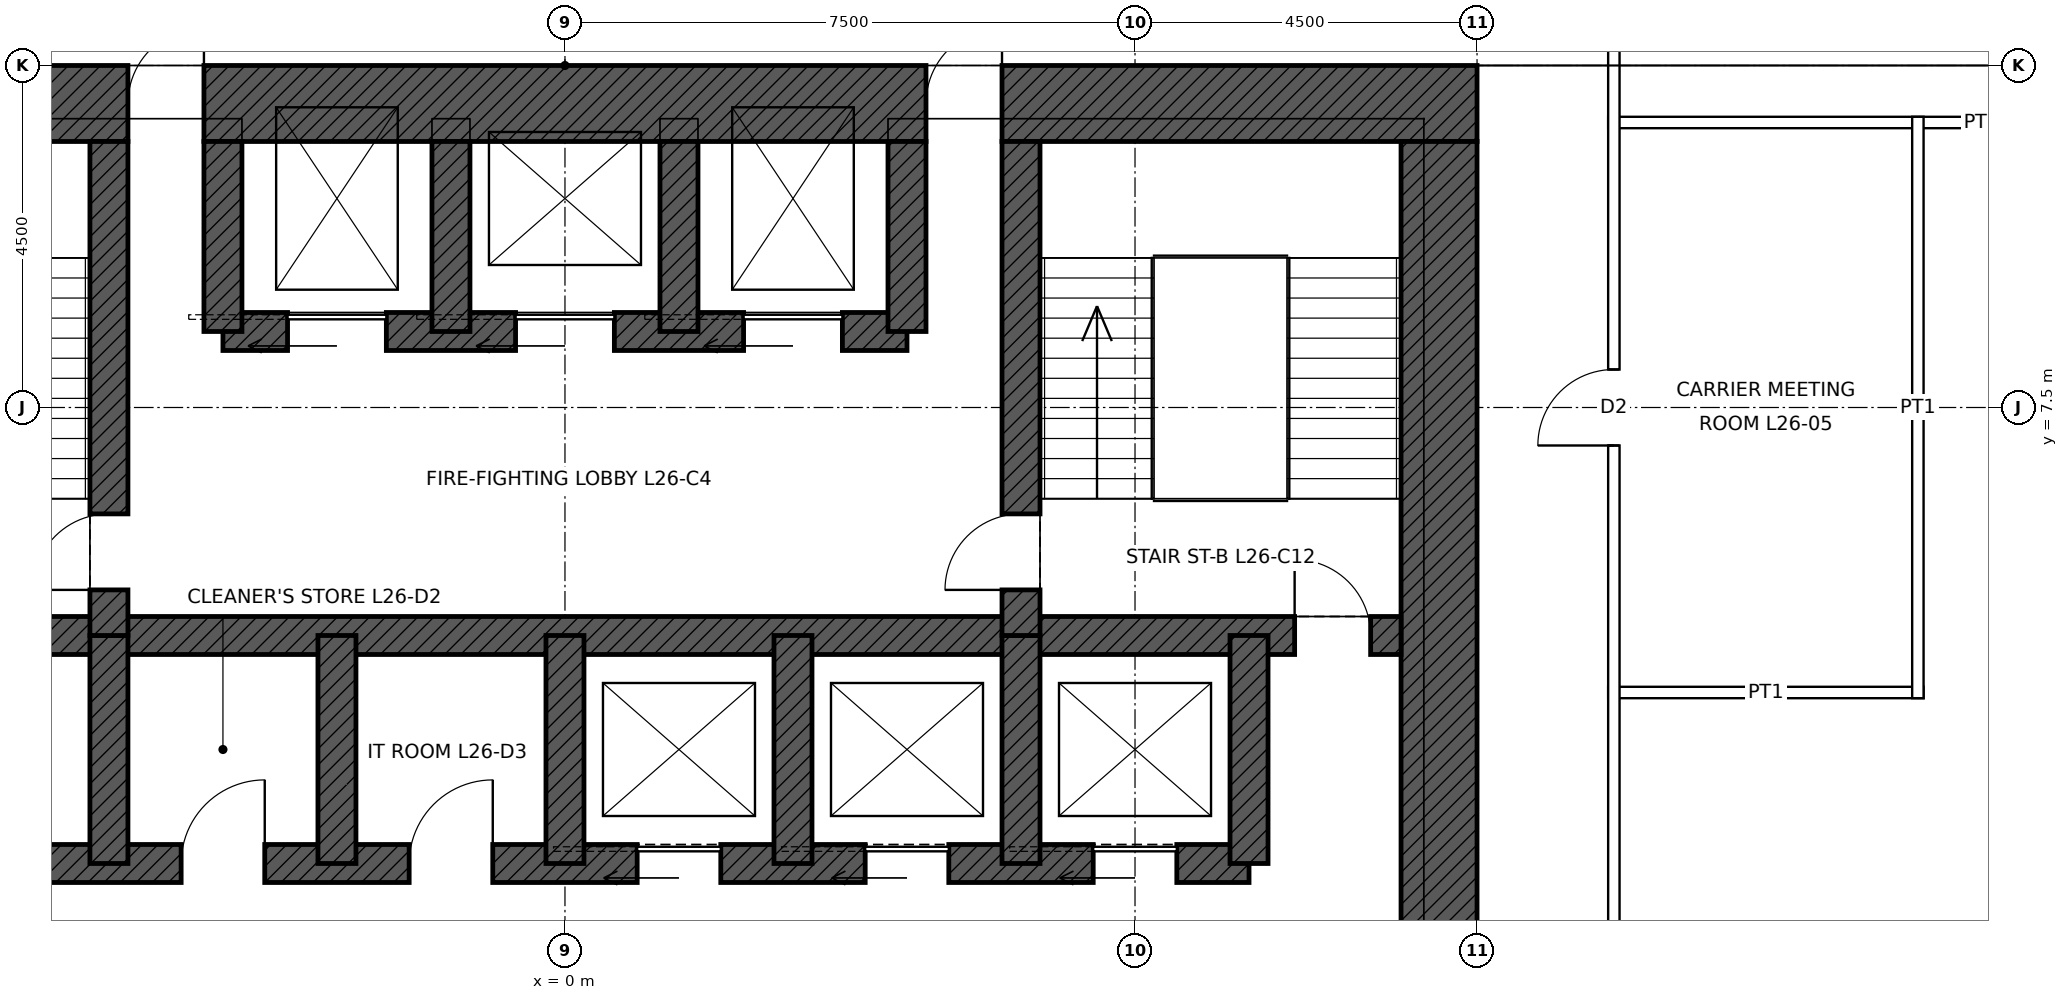
"""IFC4 building model, lengths in metres.
Left out: names, types, materials, properties, quantities, classifications, styles, units other than length and angle.
Written with IfcOpenShell. Run it as: python <this file> out.ifc"""

import sys

from ifc_helpers import new_model, si_unit, direction, frame, frame_2d, origin, place, context, subcontext, project, spatial, rectangle, extrude, element, fill, save


model = new_model("IFC4")
c1 = context("Model", 3, precision=1e-05, world=origin(), true_north=direction((0.0, 1.0)))
c2 = subcontext(c1, "Body", "Model", "MODEL_VIEW")
j1 = project(units=[si_unit("LENGTHUNIT", "METRE"), si_unit("PLANEANGLEUNIT", "RADIAN")], contexts=[c1])
p1 = place(None, origin())
s1 = spatial("IfcSite", under=j1, at=p1, CompositionType="ELEMENT")
p2 = place(p1, origin())
s2 = spatial("IfcBuilding", under=s1, at=p2, CompositionType="ELEMENT")
p3 = place(p2, frame((0.0, 0.0, 131.4)))
s3 = spatial("IfcBuildingStorey", under=s2, at=p3, CompositionType="ELEMENT", Elevation=131.4)
p4 = place(p3, frame((-12.0, 11.5, 0.0), z_axis=(0.0, 0.0, 1.0), x_axis=(1.0, 0.0, 0.0)))
e1 = element("IfcWall", 1, at=p4, inside=s3, PredefinedType="SHEAR", context=c2, shape_type="SweptSolid", body=[
    extrude(rectangle(XDim=24.0, YDim=1.0, at=frame_2d((12.0, 0.0))), origin(), (0.0, 0.0, 1.0), 4.5),
])
p5 = place(p4, frame((6.25, 0.0, 0.0)))
e2 = element("IfcOpeningElement", 2, at=p5, cuts=e1, PredefinedType="OPENING", context=c2, shape_type="SweptSolid", body=[
    extrude(rectangle(XDim=1.0, YDim=2.4, at=frame_2d((0.5, 1.2))), frame((0.0, 0.51, 0.0), z_axis=(0.0, -1.0, 0.0), x_axis=(1.0, 0.0, 0.0)), (0.0, 0.0, 1.0), 1.02),
])
p6 = place(p4, frame((16.75, 0.0, 0.0)))
e3 = element("IfcOpeningElement", 3, at=p6, cuts=e1, PredefinedType="OPENING", context=c2, shape_type="SweptSolid", body=[
    extrude(rectangle(XDim=1.0, YDim=2.4, at=frame_2d((0.5, 1.2))), frame((0.0, 0.51, 0.0), z_axis=(0.0, -1.0, 0.0), x_axis=(1.0, 0.0, 0.0)), (0.0, 0.0, 1.0), 1.02),
])
p7 = place(p3, frame((11.5, 11.0, 0.0), z_axis=(0.0, 0.0, 1.0), x_axis=(0.0, -1.0, 0.0)))
e4 = element("IfcWall", 4, at=p7, inside=s3, PredefinedType="SHEAR", context=c2, shape_type="SweptSolid", body=[
    extrude(rectangle(XDim=22.0, YDim=1.0, at=frame_2d((11.0, 0.0))), origin(), (0.0, 0.0, 1.0), 4.5),
])
p8 = place(p7, frame((10.5, 0.0, 0.0)))
e5 = element("IfcOpeningElement", 5, at=p8, cuts=e4, PredefinedType="OPENING", context=c2, shape_type="SweptSolid", body=[
    extrude(rectangle(XDim=1.0, YDim=2.4, at=frame_2d((0.5, 1.2))), frame((0.0, 0.51, 0.0), z_axis=(0.0, -1.0, 0.0), x_axis=(1.0, 0.0, 0.0)), (0.0, 0.0, 1.0), 1.02),
])
p9 = place(p3, frame((-11.0, 4.5, 0.0), z_axis=(0.0, 0.0, 1.0), x_axis=(1.0, 0.0, 0.0)))
e6 = element("IfcWall", 6, at=p9, inside=s3, PredefinedType="SHEAR", context=c2, shape_type="SweptSolid", body=[
    extrude(rectangle(XDim=22.0, YDim=0.5, at=frame_2d((11.0, 0.0))), origin(), (0.0, 0.0, 1.0), 4.5),
])
p10 = place(p9, frame((0.4, 0.0, 0.0)))
e7 = element("IfcOpeningElement", 7, at=p10, cuts=e6, PredefinedType="OPENING", context=c2, shape_type="SweptSolid", body=[
    extrude(rectangle(XDim=1.0, YDim=2.1, at=frame_2d((0.5, 1.05))), frame((0.0, 0.26, 0.0), z_axis=(0.0, -1.0, 0.0), x_axis=(1.0, 0.0, 0.0)), (0.0, 0.0, 1.0), 0.52),
])
p11 = place(p9, frame((20.6, 0.0, 0.0)))
e8 = element("IfcOpeningElement", 8, at=p11, cuts=e6, PredefinedType="OPENING", context=c2, shape_type="SweptSolid", body=[
    extrude(rectangle(XDim=1.0, YDim=2.1, at=frame_2d((0.5, 1.05))), frame((0.0, 0.26, 0.0), z_axis=(0.0, -1.0, 0.0), x_axis=(1.0, 0.0, 0.0)), (0.0, 0.0, 1.0), 0.52),
])
p12 = place(p3, frame((-9.0, 1.5, 0.0), z_axis=(0.0, 0.0, 1.0), x_axis=(1.0, 0.0, 0.0)))
e9 = element("IfcWall", 9, at=p12, inside=s3, PredefinedType="SHEAR", context=c2, shape_type="SweptSolid", body=[
    extrude(rectangle(XDim=18.0, YDim=0.5, at=frame_2d((9.0, 0.0))), origin(), (0.0, 0.0, 1.0), 4.5),
])
p13 = place(p12, frame((9.95, 0.0, 0.0)))
e10 = element("IfcOpeningElement", 10, at=p13, cuts=e9, PredefinedType="OPENING", context=c2, shape_type="SweptSolid", body=[
    extrude(rectangle(XDim=1.1, YDim=2.1, at=frame_2d((0.55, 1.05))), frame((0.0, 0.26, 0.0), z_axis=(0.0, -1.0, 0.0), x_axis=(1.0, 0.0, 0.0)), (0.0, 0.0, 1.0), 0.52),
])
p14 = place(p12, frame((12.95, 0.0, 0.0)))
e11 = element("IfcOpeningElement", 11, at=p14, cuts=e9, PredefinedType="OPENING", context=c2, shape_type="SweptSolid", body=[
    extrude(rectangle(XDim=1.1, YDim=2.1, at=frame_2d((0.55, 1.05))), frame((0.0, 0.26, 0.0), z_axis=(0.0, -1.0, 0.0), x_axis=(1.0, 0.0, 0.0)), (0.0, 0.0, 1.0), 0.52),
])
p15 = place(p12, frame((15.95, 0.0, 0.0)))
e12 = element("IfcOpeningElement", 12, at=p15, cuts=e9, PredefinedType="OPENING", context=c2, shape_type="SweptSolid", body=[
    extrude(rectangle(XDim=1.1, YDim=2.1, at=frame_2d((0.55, 1.05))), frame((0.0, 0.26, 0.0), z_axis=(0.0, -1.0, 0.0), x_axis=(1.0, 0.0, 0.0)), (0.0, 0.0, 1.0), 0.52),
])
p16 = place(p12, frame((0.95, 0.0, 0.0)))
e13 = element("IfcOpeningElement", 13, at=p16, cuts=e9, PredefinedType="OPENING", context=c2, shape_type="SweptSolid", body=[
    extrude(rectangle(XDim=1.1, YDim=2.1, at=frame_2d((0.55, 1.05))), frame((0.0, 0.26, 0.0), z_axis=(0.0, -1.0, 0.0), x_axis=(1.0, 0.0, 0.0)), (0.0, 0.0, 1.0), 0.52),
])
p17 = place(p12, frame((3.95, 0.0, 0.0)))
e14 = element("IfcOpeningElement", 14, at=p17, cuts=e9, PredefinedType="OPENING", context=c2, shape_type="SweptSolid", body=[
    extrude(rectangle(XDim=1.1, YDim=2.1, at=frame_2d((0.55, 1.05))), frame((0.0, 0.26, 0.0), z_axis=(0.0, -1.0, 0.0), x_axis=(1.0, 0.0, 0.0)), (0.0, 0.0, 1.0), 0.52),
])
p18 = place(p12, frame((6.95, 0.0, 0.0)))
e15 = element("IfcOpeningElement", 15, at=p18, cuts=e9, PredefinedType="OPENING", context=c2, shape_type="SweptSolid", body=[
    extrude(rectangle(XDim=1.1, YDim=2.1, at=frame_2d((0.55, 1.05))), frame((0.0, 0.26, 0.0), z_axis=(0.0, -1.0, 0.0), x_axis=(1.0, 0.0, 0.0)), (0.0, 0.0, 1.0), 0.52),
])
p19 = place(p3, frame((-4.5, 8.5, 0.0), z_axis=(0.0, 0.0, 1.0), x_axis=(1.0, 0.0, 0.0)))
e16 = element("IfcWall", 16, at=p19, inside=s3, PredefinedType="SHEAR", context=c2, shape_type="SweptSolid", body=[
    extrude(rectangle(XDim=9.0, YDim=0.5, at=frame_2d((4.5, 0.0))), origin(), (0.0, 0.0, 1.0), 4.5),
])
p20 = place(p19, frame((0.85, 0.0, 0.0)))
e17 = element("IfcOpeningElement", 17, at=p20, cuts=e16, PredefinedType="OPENING", context=c2, shape_type="SweptSolid", body=[
    extrude(rectangle(XDim=1.3, YDim=2.4, at=frame_2d((0.65, 1.2))), frame((0.0, 0.26, 0.0), z_axis=(0.0, -1.0, 0.0), x_axis=(1.0, 0.0, 0.0)), (0.0, 0.0, 1.0), 0.52),
])
p21 = place(p19, frame((6.85, 0.0, 0.0)))
e18 = element("IfcOpeningElement", 18, at=p21, cuts=e16, PredefinedType="OPENING", context=c2, shape_type="SweptSolid", body=[
    extrude(rectangle(XDim=1.3, YDim=2.4, at=frame_2d((0.65, 1.2))), frame((0.0, 0.26, 0.0), z_axis=(0.0, -1.0, 0.0), x_axis=(1.0, 0.0, 0.0)), (0.0, 0.0, 1.0), 0.52),
])
p22 = place(p19, frame((3.85, 0.0, 0.0)))
e19 = element("IfcOpeningElement", 19, at=p22, cuts=e16, PredefinedType="OPENING", context=c2, shape_type="SweptSolid", body=[
    extrude(rectangle(XDim=1.3, YDim=2.4, at=frame_2d((0.65, 1.2))), frame((0.0, 0.26, 0.0), z_axis=(0.0, -1.0, 0.0), x_axis=(1.0, 0.0, 0.0)), (0.0, 0.0, 1.0), 0.52),
])
for number, where, z_axis, x_axis in (
    (20, (9.0, 1.5, 0.0), (0.0, 0.0, 1.0), (0.0, 1.0, 0.0)),
    (21, (-6.0, 1.5, 0.0), (0.0, 0.0, 1.0), (0.0, 1.0, 0.0)),
    (22, (-3.0, 1.5, 0.0), (0.0, 0.0, 1.0), (0.0, 1.0, 0.0)),
    (23, (0.0, 1.5, 0.0), (0.0, 0.0, 1.0), (0.0, 1.0, 0.0)),
    (24, (3.0, 1.5, 0.0), (0.0, 0.0, 1.0), (0.0, 1.0, 0.0)),
    (25, (6.0, 1.5, 0.0), (0.0, 0.0, 1.0), (0.0, 1.0, 0.0)),
):
    element("IfcWall", number, at=place(p3, frame(where, z_axis=z_axis, x_axis=x_axis)), inside=s3, PredefinedType="SHEAR", context=c2, shape_type="SweptSolid", body=[
        extrude(rectangle(XDim=3.0, YDim=0.5, at=frame_2d((1.5, 0.0))), origin(), (0.0, 0.0, 1.0), 4.5),
    ])
p23 = place(p3, frame((-6.0, 4.5, 0.0), z_axis=(0.0, 0.0, 1.0), x_axis=(0.0, 1.0, 0.0)))
e26 = element("IfcWall", 26, at=p23, inside=s3, PredefinedType="SHEAR", context=c2, shape_type="SweptSolid", body=[
    extrude(rectangle(XDim=6.5, YDim=0.5, at=frame_2d((3.25, 0.0))), origin(), (0.0, 0.0, 1.0), 4.5),
])
p24 = place(p23, frame((0.6, 0.0, 0.0)))
e27 = element("IfcOpeningElement", 27, at=p24, cuts=e26, PredefinedType="OPENING", context=c2, shape_type="SweptSolid", body=[
    extrude(rectangle(XDim=1.0, YDim=2.1, at=frame_2d((0.5, 1.05))), frame((0.0, 0.26, 0.0), z_axis=(0.0, -1.0, 0.0), x_axis=(1.0, 0.0, 0.0)), (0.0, 0.0, 1.0), 0.52),
])
p25 = place(p3, frame((6.0, 4.5, 0.0), z_axis=(0.0, 0.0, 1.0), x_axis=(0.0, 1.0, 0.0)))
e28 = element("IfcWall", 28, at=p25, inside=s3, PredefinedType="SHEAR", context=c2, shape_type="SweptSolid", body=[
    extrude(rectangle(XDim=6.5, YDim=0.5, at=frame_2d((3.25, 0.0))), origin(), (0.0, 0.0, 1.0), 4.5),
])
p26 = place(p25, frame((0.6, 0.0, 0.0)))
e29 = element("IfcOpeningElement", 29, at=p26, cuts=e28, PredefinedType="OPENING", context=c2, shape_type="SweptSolid", body=[
    extrude(rectangle(XDim=1.0, YDim=2.1, at=frame_2d((0.5, 1.05))), frame((0.0, 0.26, 0.0), z_axis=(0.0, -1.0, 0.0), x_axis=(1.0, 0.0, 0.0)), (0.0, 0.0, 1.0), 0.52),
])
for number, where, z_axis, x_axis in (
    (30, (-4.5, 8.5, 0.0), (0.0, 0.0, 1.0), (0.0, 1.0, 0.0)),
    (31, (4.5, 8.5, 0.0), (0.0, 0.0, 1.0), (0.0, 1.0, 0.0)),
    (32, (-1.5, 8.5, 0.0), (0.0, 0.0, 1.0), (0.0, 1.0, 0.0)),
    (33, (1.5, 8.5, 0.0), (0.0, 0.0, 1.0), (0.0, 1.0, 0.0)),
):
    element("IfcWall", number, at=place(p3, frame(where, z_axis=z_axis, x_axis=x_axis)), inside=s3, PredefinedType="SHEAR", context=c2, shape_type="SweptSolid", body=[
        extrude(rectangle(XDim=2.5, YDim=0.5, at=frame_2d((1.25, 0.0))), origin(), (0.0, 0.0, 1.0), 4.5),
    ])
p27 = place(p3, frame((13.725, 3.75, 0.0), z_axis=(0.0, 0.0, 1.0), x_axis=(1.0, 0.0, 0.0)))
e34 = element("IfcWall", 34, at=p27, inside=s3, PredefinedType="PARTITIONING", context=c2, shape_type="SweptSolid", body=[
    extrude(rectangle(XDim=4.15, YDim=0.15, at=frame_2d((2.075, 0.0))), origin(), (0.0, 0.0, 1.0), 3.431),
])
p28 = place(p3, frame((13.725, 11.25, 0.0), z_axis=(0.0, 0.0, 1.0), x_axis=(1.0, 0.0, 0.0)))
e35 = element("IfcWall", 35, at=p28, inside=s3, PredefinedType="PARTITIONING", context=c2, shape_type="SweptSolid", body=[
    extrude(rectangle(XDim=9.825, YDim=0.15, at=frame_2d((4.913, 0.0))), origin(), (0.0, 0.0, 1.0), 3.431),
])
p29 = place(p3, frame((13.8, -13.875, 0.0), z_axis=(0.0, 0.0, 1.0), x_axis=(0.0, 1.0, 0.0)))
e36 = element("IfcWall", 36, at=p29, inside=s3, PredefinedType="PARTITIONING", context=c2, shape_type="SweptSolid", body=[
    extrude(rectangle(XDim=27.75, YDim=0.15, at=frame_2d((13.875, 0.0))), origin(), (0.0, 0.0, 1.0), 4.3),
])
p30 = place(p29, frame((20.875, 0.0, 0.0)))
e37 = element("IfcOpeningElement", 37, at=p30, cuts=e36, PredefinedType="OPENING", context=c2, shape_type="SweptSolid", body=[
    extrude(rectangle(XDim=1.0, YDim=2.1, at=frame_2d((0.5, 1.05))), frame((0.0, 0.085, 0.0), z_axis=(0.0, -1.0, 0.0), x_axis=(1.0, 0.0, 0.0)), (0.0, 0.0, 1.0), 0.17),
])
p31 = place(p29, frame((9.225, 0.0, 0.0)))
e38 = element("IfcOpeningElement", 38, at=p31, cuts=e36, PredefinedType="OPENING", context=c2, shape_type="SweptSolid", body=[
    extrude(rectangle(XDim=1.8, YDim=2.4, at=frame_2d((0.9, 1.2))), frame((0.0, 0.085, 0.0), z_axis=(0.0, -1.0, 0.0), x_axis=(1.0, 0.0, 0.0)), (0.0, 0.0, 1.0), 0.17),
])
p32 = place(p3, frame((17.8, 3.675, 0.0), z_axis=(0.0, 0.0, 1.0), x_axis=(0.0, 1.0, 0.0)))
e39 = element("IfcWall", 39, at=p32, inside=s3, PredefinedType="PARTITIONING", context=c2, shape_type="SweptSolid", body=[
    extrude(rectangle(XDim=7.65, YDim=0.15, at=frame_2d((3.825, 0.0))), origin(), (0.0, 0.0, 1.0), 4.3),
])
p33 = place(p11, origin())
e40 = element("IfcDoor", 40, at=p33, inside=s3, OperationType="SINGLE_SWING_LEFT", PredefinedType="DOOR", context=c2, shape_type="SweptSolid", body=[
    extrude(rectangle(XDim=1.0, YDim=2.1, at=frame_2d((0.5, 1.05))), frame((0.0, 0.025, 0.0), z_axis=(0.0, -1.0, 0.0), x_axis=(1.0, 0.0, 0.0)), (0.0, 0.0, 1.0), 0.05),
])
fill(e8, e40)
p34 = place(p24, origin())
e41 = element("IfcDoor", 41, at=p34, inside=s3, OperationType="SINGLE_SWING_LEFT", PredefinedType="DOOR", context=c2, shape_type="SweptSolid", body=[
    extrude(rectangle(XDim=1.0, YDim=2.1, at=frame_2d((0.5, 1.05))), frame((0.0, 0.025, 0.0), z_axis=(0.0, -1.0, 0.0), x_axis=(1.0, 0.0, 0.0)), (0.0, 0.0, 1.0), 0.05),
])
fill(e27, e41)
p35 = place(p26, origin())
e42 = element("IfcDoor", 42, at=p35, inside=s3, OperationType="SINGLE_SWING_LEFT", PredefinedType="DOOR", context=c2, shape_type="SweptSolid", body=[
    extrude(rectangle(XDim=1.0, YDim=2.1, at=frame_2d((0.5, 1.05))), frame((0.0, 0.025, 0.0), z_axis=(0.0, -1.0, 0.0), x_axis=(1.0, 0.0, 0.0)), (0.0, 0.0, 1.0), 0.05),
])
fill(e29, e42)
p36 = place(p5, origin())
e43 = element("IfcDoor", 43, at=p36, inside=s3, OperationType="SINGLE_SWING_RIGHT", PredefinedType="DOOR", context=c2, shape_type="SweptSolid", body=[
    extrude(rectangle(XDim=1.0, YDim=2.4, at=frame_2d((0.5, 1.2))), frame((0.0, 0.485, 0.0), z_axis=(0.0, -1.0, 0.0), x_axis=(1.0, 0.0, 0.0)), (0.0, 0.0, 1.0), 0.05),
])
fill(e2, e43)
p37 = place(p6, origin())
e44 = element("IfcDoor", 44, at=p37, inside=s3, OperationType="SINGLE_SWING_RIGHT", PredefinedType="DOOR", context=c2, shape_type="SweptSolid", body=[
    extrude(rectangle(XDim=1.0, YDim=2.4, at=frame_2d((0.5, 1.2))), frame((0.0, 0.485, 0.0), z_axis=(0.0, -1.0, 0.0), x_axis=(1.0, 0.0, 0.0)), (0.0, 0.0, 1.0), 0.05),
])
fill(e3, e44)
p38 = place(p20, origin())
e45 = element("IfcDoor", 45, at=p38, inside=s3, OperationType="SLIDING_TO_LEFT", PredefinedType="DOOR", context=c2, shape_type="SweptSolid", body=[
    extrude(rectangle(XDim=1.3, YDim=2.4, at=frame_2d((0.65, 1.2))), frame((0.0, 0.025, 0.0), z_axis=(0.0, -1.0, 0.0), x_axis=(1.0, 0.0, 0.0)), (0.0, 0.0, 1.0), 0.05),
])
fill(e17, e45)
p39 = place(p21, origin())
e46 = element("IfcDoor", 46, at=p39, inside=s3, OperationType="SLIDING_TO_LEFT", PredefinedType="DOOR", context=c2, shape_type="SweptSolid", body=[
    extrude(rectangle(XDim=1.3, YDim=2.4, at=frame_2d((0.65, 1.2))), frame((0.0, 0.025, 0.0), z_axis=(0.0, -1.0, 0.0), x_axis=(1.0, 0.0, 0.0)), (0.0, 0.0, 1.0), 0.05),
])
fill(e18, e46)
p40 = place(p22, origin())
e47 = element("IfcDoor", 47, at=p40, inside=s3, OperationType="SLIDING_TO_LEFT", PredefinedType="DOOR", context=c2, shape_type="SweptSolid", body=[
    extrude(rectangle(XDim=1.3, YDim=2.4, at=frame_2d((0.65, 1.2))), frame((0.0, 0.025, 0.0), z_axis=(0.0, -1.0, 0.0), x_axis=(1.0, 0.0, 0.0)), (0.0, 0.0, 1.0), 0.05),
])
fill(e19, e47)
p41 = place(p13, origin())
e48 = element("IfcDoor", 48, at=p41, inside=s3, OperationType="SLIDING_TO_LEFT", PredefinedType="DOOR", context=c2, shape_type="SweptSolid", body=[
    extrude(rectangle(XDim=1.1, YDim=2.1, at=frame_2d((0.55, 1.05))), frame((0.0, 0.025, 0.0), z_axis=(0.0, -1.0, 0.0), x_axis=(1.0, 0.0, 0.0)), (0.0, 0.0, 1.0), 0.05),
])
fill(e10, e48)
p42 = place(p14, origin())
e49 = element("IfcDoor", 49, at=p42, inside=s3, OperationType="SLIDING_TO_LEFT", PredefinedType="DOOR", context=c2, shape_type="SweptSolid", body=[
    extrude(rectangle(XDim=1.1, YDim=2.1, at=frame_2d((0.55, 1.05))), frame((0.0, 0.025, 0.0), z_axis=(0.0, -1.0, 0.0), x_axis=(1.0, 0.0, 0.0)), (0.0, 0.0, 1.0), 0.05),
])
fill(e11, e49)
p43 = place(p15, origin())
e50 = element("IfcDoor", 50, at=p43, inside=s3, OperationType="SLIDING_TO_LEFT", PredefinedType="DOOR", context=c2, shape_type="SweptSolid", body=[
    extrude(rectangle(XDim=1.1, YDim=2.1, at=frame_2d((0.55, 1.05))), frame((0.0, 0.025, 0.0), z_axis=(0.0, -1.0, 0.0), x_axis=(1.0, 0.0, 0.0)), (0.0, 0.0, 1.0), 0.05),
])
fill(e12, e50)
p44 = place(p17, origin())
e51 = element("IfcDoor", 51, at=p44, inside=s3, OperationType="SINGLE_SWING_RIGHT", PredefinedType="DOOR", context=c2, shape_type="SweptSolid", body=[
    extrude(rectangle(XDim=1.1, YDim=2.1, at=frame_2d((0.55, 1.05))), frame((0.0, 0.025, 0.0), z_axis=(0.0, -1.0, 0.0), x_axis=(1.0, 0.0, 0.0)), (0.0, 0.0, 1.0), 0.05),
])
fill(e14, e51)
p45 = place(p18, origin())
e52 = element("IfcDoor", 52, at=p45, inside=s3, OperationType="SINGLE_SWING_RIGHT", PredefinedType="DOOR", context=c2, shape_type="SweptSolid", body=[
    extrude(rectangle(XDim=1.1, YDim=2.1, at=frame_2d((0.55, 1.05))), frame((0.0, 0.025, 0.0), z_axis=(0.0, -1.0, 0.0), x_axis=(1.0, 0.0, 0.0)), (0.0, 0.0, 1.0), 0.05),
])
fill(e15, e52)
p46 = place(p30, origin())
e53 = element("IfcDoor", 53, at=p46, inside=s3, OperationType="SINGLE_SWING_LEFT", PredefinedType="DOOR", context=c2, shape_type="SweptSolid", body=[
    extrude(rectangle(XDim=1.0, YDim=2.1, at=frame_2d((0.5, 1.05))), frame((0.0, 0.025, 0.0), z_axis=(0.0, -1.0, 0.0), x_axis=(1.0, 0.0, 0.0)), (0.0, 0.0, 1.0), 0.05),
])
fill(e37, e53)
save(model, sys.argv[1])
